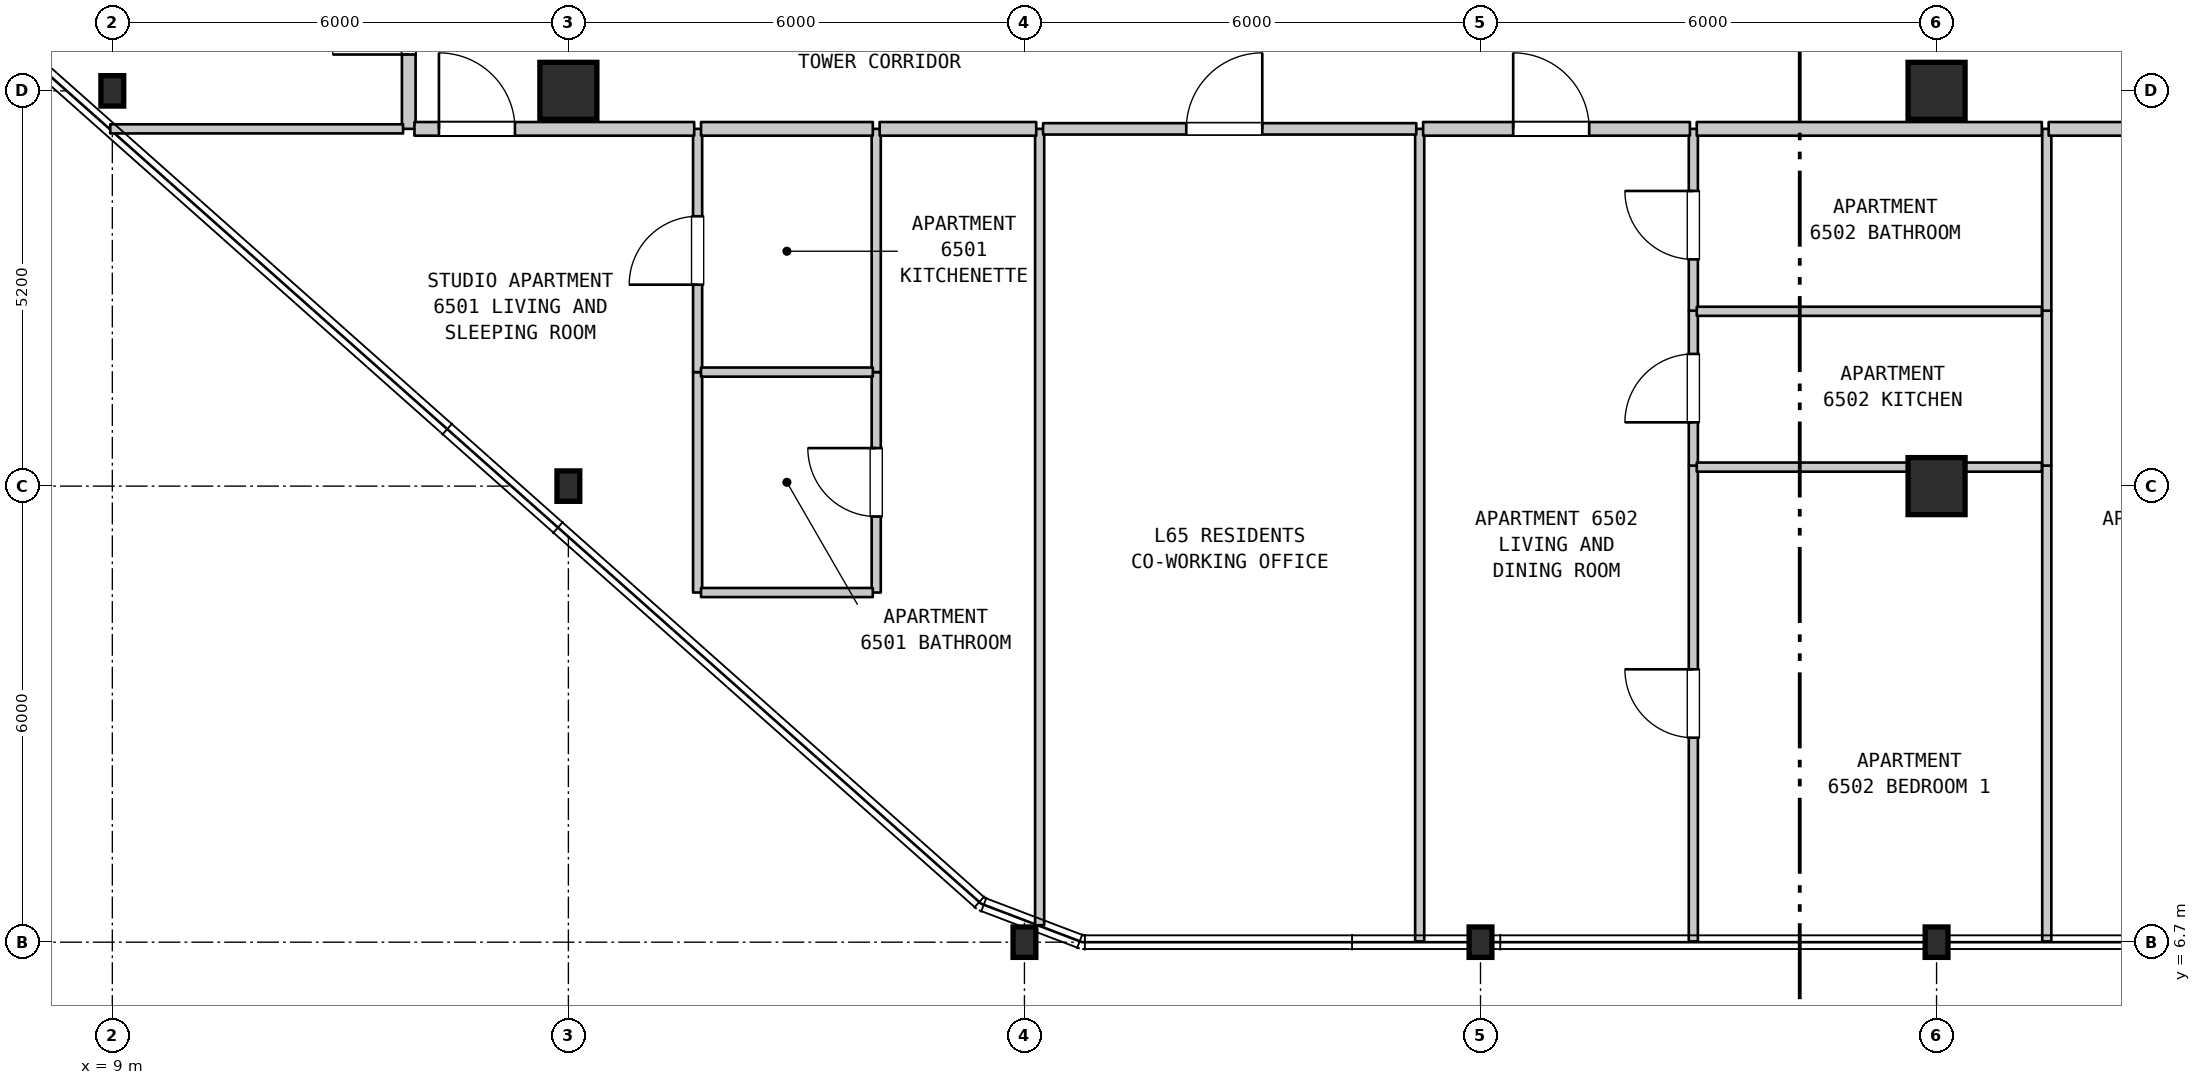
"""IFC4 building model, lengths in metres.
Left out: names, types, materials, properties, quantities, classifications, styles, units other than length and angle.
Written with IfcOpenShell. Run it as: python <this file> out.ifc"""

import sys

from ifc_helpers import new_model, si_unit, direction, frame, frame_2d, origin, origin_2d, place, context, subcontext, project, spatial, rectangle, i_section, extrude, element, fill, save


model = new_model("IFC4")
c1 = context("Model", 3, precision=1e-05, world=origin(), true_north=direction((0.0, 1.0)))
c2 = subcontext(c1, "Body", "Model", "MODEL_VIEW")
j1 = project(units=[si_unit("LENGTHUNIT", "METRE"), si_unit("PLANEANGLEUNIT", "RADIAN")], contexts=[c1])
p1 = place(None, origin())
s1 = spatial("IfcSite", under=j1, at=p1, CompositionType="ELEMENT")
p2 = place(p1, origin())
s2 = spatial("IfcBuilding", under=s1, at=p2, CompositionType="ELEMENT")
p3 = place(p2, frame((0.0, 0.0, 262.1)))
s3 = spatial("IfcBuildingStorey", under=s2, at=p3, CompositionType="ELEMENT", Elevation=262.1)
for number, where, z_axis, x_axis in (
    (1, (9.0, 17.9, 0.0), (0.0, 0.0, 1.0), (1.0, 0.0, 0.0)),
    (2, (15.0, 12.7, 0.0), (0.0, 0.0, 1.0), (1.0, 0.0, 0.0)),
):
    element("IfcColumn", number, at=place(p3, frame(where, z_axis=z_axis, x_axis=x_axis)), inside=s3, PredefinedType="COLUMN", context=c2, shape_type="SweptSolid", body=[
        extrude(i_section(OverallWidth=0.3, OverallDepth=0.4, WebThickness=0.013, FlangeThickness=0.024, FilletRadius=0.027, at=origin_2d()), origin(), (0.0, 0.0, 1.0), 3.7),
    ])
p4 = place(p3, frame((15.0, 17.9, 0.0), z_axis=(0.0, 0.0, 1.0), x_axis=(1.0, 0.0, 0.0)))
e3 = element("IfcColumn", 3, at=p4, inside=s3, PredefinedType="COLUMN", context=c2, shape_type="SweptSolid", body=[
    extrude(rectangle(XDim=0.75, YDim=0.75, at=origin_2d()), origin(), (0.0, 0.0, 1.0), 3.7),
])
for number, where, z_axis, x_axis in (
    (4, (21.0, 6.7, 0.0), (0.0, 0.0, 1.0), (1.0, 0.0, 0.0)),
    (5, (27.0, 6.7, 0.0), (0.0, 0.0, 1.0), (1.0, 0.0, 0.0)),
    (6, (33.0, 6.7, 0.0), (0.0, 0.0, 1.0), (1.0, 0.0, 0.0)),
):
    element("IfcColumn", number, at=place(p3, frame(where, z_axis=z_axis, x_axis=x_axis)), inside=s3, PredefinedType="COLUMN", context=c2, shape_type="SweptSolid", body=[
        extrude(i_section(OverallWidth=0.3, OverallDepth=0.4, WebThickness=0.013, FlangeThickness=0.024, FilletRadius=0.027, at=origin_2d()), origin(), (0.0, 0.0, 1.0), 3.7),
    ])
for number, where, z_axis, x_axis in (
    (7, (33.0, 12.7, 0.0), (0.0, 0.0, 1.0), (1.0, 0.0, 0.0)),
    (8, (33.0, 17.9, 0.0), (0.0, 0.0, 1.0), (1.0, 0.0, 0.0)),
):
    element("IfcColumn", number, at=place(p3, frame(where, z_axis=z_axis, x_axis=x_axis)), inside=s3, PredefinedType="COLUMN", context=c2, shape_type="SweptSolid", body=[
        extrude(rectangle(XDim=0.75, YDim=0.75, at=origin_2d()), origin(), (0.0, 0.0, 1.0), 3.7),
    ])
p5 = place(p3, frame((12.9, 17.4, 0.0), z_axis=(0.0, 0.0, 1.0), x_axis=(0.0, 1.0, 0.0)))
e9 = element("IfcWall", 9, at=p5, inside=s3, PredefinedType="STANDARD", context=c2, shape_type="SweptSolid", body=[
    extrude(rectangle(XDim=3.1, YDim=0.18, at=frame_2d((1.55, 0.0))), origin(), (0.0, 0.0, 1.0), 3.39),
])
p6 = place(p5, frame((0.978, 0.0, 0.0)))
e10 = element("IfcOpeningElement", 10, at=p6, cuts=e9, PredefinedType="OPENING", context=c2, shape_type="SweptSolid", body=[
    extrude(rectangle(XDim=1.0, YDim=2.15, at=frame_2d((0.5, 1.075))), frame((0.0, 0.1, 0.0), z_axis=(0.0, -1.0, 0.0), x_axis=(1.0, 0.0, 0.0)), (0.0, 0.0, 1.0), 0.2),
])
p7 = place(p3, frame((16.7, 11.3, 0.0), z_axis=(0.0, 0.0, 1.0), x_axis=(0.0, 1.0, 0.0)))
e11 = element("IfcWall", 11, at=p7, inside=s3, PredefinedType="PARTITIONING", context=c2, shape_type="SweptSolid", body=[
    extrude(rectangle(XDim=2.9, YDim=0.12, at=frame_2d((1.45, 0.0))), origin(), (0.0, 0.0, 1.0), 3.39),
])
p8 = place(p3, frame((16.7, 14.2, 0.0), z_axis=(0.0, 0.0, 1.0), x_axis=(0.0, 1.0, 0.0)))
e12 = element("IfcWall", 12, at=p8, inside=s3, PredefinedType="PARTITIONING", context=c2, shape_type="SweptSolid", body=[
    extrude(rectangle(XDim=3.2, YDim=0.12, at=frame_2d((1.6, 0.0))), origin(), (0.0, 0.0, 1.0), 3.39),
])
p9 = place(p8, frame((1.15, 0.0, 0.0)))
e13 = element("IfcOpeningElement", 13, at=p9, cuts=e12, PredefinedType="OPENING", context=c2, shape_type="SweptSolid", body=[
    extrude(rectangle(XDim=0.9, YDim=2.15, at=frame_2d((0.45, 1.075))), frame((0.0, 0.07, 0.0), z_axis=(0.0, -1.0, 0.0), x_axis=(1.0, 0.0, 0.0)), (0.0, 0.0, 1.0), 0.14),
])
p10 = place(p3, frame((19.05, 11.3, 0.0), z_axis=(0.0, 0.0, 1.0), x_axis=(0.0, 1.0, 0.0)))
e14 = element("IfcWall", 14, at=p10, inside=s3, PredefinedType="PARTITIONING", context=c2, shape_type="SweptSolid", body=[
    extrude(rectangle(XDim=2.9, YDim=0.12, at=frame_2d((1.45, 0.0))), origin(), (0.0, 0.0, 1.0), 3.39),
])
p11 = place(p10, frame((1.0, 0.0, 0.0)))
e15 = element("IfcOpeningElement", 15, at=p11, cuts=e14, PredefinedType="OPENING", context=c2, shape_type="SweptSolid", body=[
    extrude(rectangle(XDim=0.9, YDim=2.1, at=frame_2d((0.45, 1.05))), frame((0.0, 0.07, 0.0), z_axis=(0.0, -1.0, 0.0), x_axis=(1.0, 0.0, 0.0)), (0.0, 0.0, 1.0), 0.14),
])
p12 = place(p3, frame((19.05, 14.2, 0.0), z_axis=(0.0, 0.0, 1.0), x_axis=(0.0, 1.0, 0.0)))
e16 = element("IfcWall", 16, at=p12, inside=s3, PredefinedType="PARTITIONING", context=c2, shape_type="SweptSolid", body=[
    extrude(rectangle(XDim=3.2, YDim=0.12, at=frame_2d((1.6, 0.0))), origin(), (0.0, 0.0, 1.0), 3.39),
])
p13 = place(p3, frame((21.2, 6.923, 0.0), z_axis=(0.0, 0.0, 1.0), x_axis=(0.0, 1.0, 0.0)))
e17 = element("IfcWall", 17, at=p13, inside=s3, PredefinedType="PARTITIONING", context=c2, shape_type="SweptSolid", body=[
    extrude(rectangle(XDim=10.477, YDim=0.12, at=frame_2d((5.238, 0.0))), origin(), (0.0, 0.0, 1.0), 3.39),
])
p14 = place(p3, frame((26.2, 6.71, 0.0), z_axis=(0.0, 0.0, 1.0), x_axis=(0.0, 1.0, 0.0)))
e18 = element("IfcWall", 18, at=p14, inside=s3, PredefinedType="PARTITIONING", context=c2, shape_type="SweptSolid", body=[
    extrude(rectangle(XDim=10.69, YDim=0.12, at=frame_2d((5.345, 0.0))), origin(), (0.0, 0.0, 1.0), 3.39),
])
p15 = place(p3, frame((29.8, 6.71, 0.0), z_axis=(0.0, 0.0, 1.0), x_axis=(0.0, 1.0, 0.0)))
e19 = element("IfcWall", 19, at=p15, inside=s3, PredefinedType="PARTITIONING", context=c2, shape_type="SweptSolid", body=[
    extrude(rectangle(XDim=6.26, YDim=0.12, at=frame_2d((3.13, 0.0))), origin(), (0.0, 0.0, 1.0), 3.39),
])
p16 = place(p15, frame((2.68, 0.0, 0.0)))
e20 = element("IfcOpeningElement", 20, at=p16, cuts=e19, PredefinedType="OPENING", context=c2, shape_type="SweptSolid", body=[
    extrude(rectangle(XDim=0.9, YDim=2.15, at=frame_2d((0.45, 1.075))), frame((0.0, 0.07, 0.0), z_axis=(0.0, -1.0, 0.0), x_axis=(1.0, 0.0, 0.0)), (0.0, 0.0, 1.0), 0.14),
])
p17 = place(p3, frame((29.8, 12.97, 0.0), z_axis=(0.0, 0.0, 1.0), x_axis=(0.0, 1.0, 0.0)))
e21 = element("IfcWall", 21, at=p17, inside=s3, PredefinedType="PARTITIONING", context=c2, shape_type="SweptSolid", body=[
    extrude(rectangle(XDim=2.038, YDim=0.12, at=frame_2d((1.019, 0.0))), origin(), (0.0, 0.0, 1.0), 3.39),
])
p18 = place(p17, frame((0.569, 0.0, 0.0)))
e22 = element("IfcOpeningElement", 22, at=p18, cuts=e21, PredefinedType="OPENING", context=c2, shape_type="SweptSolid", body=[
    extrude(rectangle(XDim=0.9, YDim=2.15, at=frame_2d((0.45, 1.075))), frame((0.0, 0.07, 0.0), z_axis=(0.0, -1.0, 0.0), x_axis=(1.0, 0.0, 0.0)), (0.0, 0.0, 1.0), 0.14),
])
p19 = place(p3, frame((29.8, 15.008, 0.0), z_axis=(0.0, 0.0, 1.0), x_axis=(0.0, 1.0, 0.0)))
e23 = element("IfcWall", 23, at=p19, inside=s3, PredefinedType="PARTITIONING", context=c2, shape_type="SweptSolid", body=[
    extrude(rectangle(XDim=2.392, YDim=0.12, at=frame_2d((1.196, 0.0))), origin(), (0.0, 0.0, 1.0), 3.39),
])
p20 = place(p19, frame((0.675, 0.0, 0.0)))
e24 = element("IfcOpeningElement", 24, at=p20, cuts=e23, PredefinedType="OPENING", context=c2, shape_type="SweptSolid", body=[
    extrude(rectangle(XDim=0.9, YDim=2.1, at=frame_2d((0.45, 1.05))), frame((0.0, 0.07, 0.0), z_axis=(0.0, -1.0, 0.0), x_axis=(1.0, 0.0, 0.0)), (0.0, 0.0, 1.0), 0.14),
])
p21 = place(p3, frame((34.45, 6.71, 0.0), z_axis=(0.0, 0.0, 1.0), x_axis=(0.0, 1.0, 0.0)))
e25 = element("IfcWall", 25, at=p21, inside=s3, PredefinedType="PARTITIONING", context=c2, shape_type="SweptSolid", body=[
    extrude(rectangle(XDim=6.26, YDim=0.12, at=frame_2d((3.13, 0.0))), origin(), (0.0, 0.0, 1.0), 3.39),
])
p22 = place(p3, frame((34.45, 12.97, 0.0), z_axis=(0.0, 0.0, 1.0), x_axis=(0.0, 1.0, 0.0)))
e26 = element("IfcWall", 26, at=p22, inside=s3, PredefinedType="PARTITIONING", context=c2, shape_type="SweptSolid", body=[
    extrude(rectangle(XDim=2.038, YDim=0.12, at=frame_2d((1.019, 0.0))), origin(), (0.0, 0.0, 1.0), 3.39),
])
p23 = place(p3, frame((34.45, 15.008, 0.0), z_axis=(0.0, 0.0, 1.0), x_axis=(0.0, 1.0, 0.0)))
e27 = element("IfcWall", 27, at=p23, inside=s3, PredefinedType="PARTITIONING", context=c2, shape_type="SweptSolid", body=[
    extrude(rectangle(XDim=2.392, YDim=0.12, at=frame_2d((1.196, 0.0))), origin(), (0.0, 0.0, 1.0), 3.39),
])
p24 = place(p3, frame((16.745, 11.3, 0.0), z_axis=(0.0, 0.0, 1.0), x_axis=(1.0, 0.0, 0.0)))
e28 = element("IfcWall", 28, at=p24, inside=s3, PredefinedType="PARTITIONING", context=c2, shape_type="SweptSolid", body=[
    extrude(rectangle(XDim=2.26, YDim=0.12, at=frame_2d((1.13, 0.0))), origin(), (0.0, 0.0, 1.0), 3.39),
])
p25 = place(p3, frame((29.845, 12.95, 0.0), z_axis=(0.0, 0.0, 1.0), x_axis=(1.0, 0.0, 0.0)))
e29 = element("IfcWall", 29, at=p25, inside=s3, PredefinedType="PARTITIONING", context=c2, shape_type="SweptSolid", body=[
    extrude(rectangle(XDim=4.54, YDim=0.12, at=frame_2d((2.27, 0.0))), origin(), (0.0, 0.0, 1.0), 3.39),
])
p26 = place(p3, frame((16.745, 14.2, 0.0), z_axis=(0.0, 0.0, 1.0), x_axis=(1.0, 0.0, 0.0)))
e30 = element("IfcWall", 30, at=p26, inside=s3, PredefinedType="PARTITIONING", context=c2, shape_type="SweptSolid", body=[
    extrude(rectangle(XDim=2.26, YDim=0.12, at=frame_2d((1.13, 0.0))), origin(), (0.0, 0.0, 1.0), 3.39),
])
p27 = place(p3, frame((29.845, 15.0, 0.0), z_axis=(0.0, 0.0, 1.0), x_axis=(1.0, 0.0, 0.0)))
e31 = element("IfcWall", 31, at=p27, inside=s3, PredefinedType="PARTITIONING", context=c2, shape_type="SweptSolid", body=[
    extrude(rectangle(XDim=4.54, YDim=0.12, at=frame_2d((2.27, 0.0))), origin(), (0.0, 0.0, 1.0), 3.39),
])
p28 = place(p3, frame((8.973, 17.4, 0.0), z_axis=(0.0, 0.0, 1.0), x_axis=(1.0, 0.0, 0.0)))
e32 = element("IfcWall", 32, at=p28, inside=s3, PredefinedType="PARTITIONING", context=c2, shape_type="SweptSolid", body=[
    extrude(rectangle(XDim=3.852, YDim=0.12, at=frame_2d((1.926, 0.0))), origin(), (0.0, 0.0, 1.0), 3.39),
])
p29 = place(p3, frame((12.975, 17.4, 0.0), z_axis=(0.0, 0.0, 1.0), x_axis=(1.0, 0.0, 0.0)))
e33 = element("IfcWall", 33, at=p29, inside=s3, PredefinedType="STANDARD", context=c2, shape_type="SweptSolid", body=[
    extrude(rectangle(XDim=3.68, YDim=0.18, at=frame_2d((1.84, 0.0))), origin(), (0.0, 0.0, 1.0), 3.39),
])
p30 = place(p29, frame((0.322, 0.0, 0.0)))
e34 = element("IfcOpeningElement", 34, at=p30, cuts=e33, PredefinedType="OPENING", context=c2, shape_type="SweptSolid", body=[
    extrude(rectangle(XDim=1.0, YDim=2.15, at=frame_2d((0.5, 1.075))), frame((0.0, 0.1, 0.0), z_axis=(0.0, -1.0, 0.0), x_axis=(1.0, 0.0, 0.0)), (0.0, 0.0, 1.0), 0.2),
])
p31 = place(p3, frame((16.745, 17.4, 0.0), z_axis=(0.0, 0.0, 1.0), x_axis=(1.0, 0.0, 0.0)))
e35 = element("IfcWall", 35, at=p31, inside=s3, PredefinedType="STANDARD", context=c2, shape_type="SweptSolid", body=[
    extrude(rectangle(XDim=2.26, YDim=0.18, at=frame_2d((1.13, 0.0))), origin(), (0.0, 0.0, 1.0), 3.39),
])
p32 = place(p3, frame((19.095, 17.4, 0.0), z_axis=(0.0, 0.0, 1.0), x_axis=(1.0, 0.0, 0.0)))
e36 = element("IfcWall", 36, at=p32, inside=s3, PredefinedType="STANDARD", context=c2, shape_type="SweptSolid", body=[
    extrude(rectangle(XDim=2.06, YDim=0.18, at=frame_2d((1.03, 0.0))), origin(), (0.0, 0.0, 1.0), 3.39),
])
p33 = place(p3, frame((21.245, 17.4, 0.0), z_axis=(0.0, 0.0, 1.0), x_axis=(1.0, 0.0, 0.0)))
e37 = element("IfcWall", 37, at=p33, inside=s3, PredefinedType="STANDARD", context=c2, shape_type="SweptSolid", body=[
    extrude(rectangle(XDim=4.91, YDim=0.15, at=frame_2d((2.455, 0.0))), origin(), (0.0, 0.0, 1.0), 3.39),
])
p34 = place(p33, frame((1.884, 0.0, 0.0)))
e38 = element("IfcOpeningElement", 38, at=p34, cuts=e37, PredefinedType="OPENING", context=c2, shape_type="SweptSolid", body=[
    extrude(rectangle(XDim=1.0, YDim=2.15, at=frame_2d((0.5, 1.075))), frame((0.0, 0.085, 0.0), z_axis=(0.0, -1.0, 0.0), x_axis=(1.0, 0.0, 0.0)), (0.0, 0.0, 1.0), 0.17),
])
p35 = place(p3, frame((26.245, 17.4, 0.0), z_axis=(0.0, 0.0, 1.0), x_axis=(1.0, 0.0, 0.0)))
e39 = element("IfcWall", 39, at=p35, inside=s3, PredefinedType="STANDARD", context=c2, shape_type="SweptSolid", body=[
    extrude(rectangle(XDim=3.51, YDim=0.18, at=frame_2d((1.755, 0.0))), origin(), (0.0, 0.0, 1.0), 3.39),
])
p36 = place(p35, frame((1.185, 0.0, 0.0)))
e40 = element("IfcOpeningElement", 40, at=p36, cuts=e39, PredefinedType="OPENING", context=c2, shape_type="SweptSolid", body=[
    extrude(rectangle(XDim=1.0, YDim=2.15, at=frame_2d((0.5, 1.075))), frame((0.0, 0.1, 0.0), z_axis=(0.0, -1.0, 0.0), x_axis=(1.0, 0.0, 0.0)), (0.0, 0.0, 1.0), 0.2),
])
p37 = place(p3, frame((29.845, 17.4, 0.0), z_axis=(0.0, 0.0, 1.0), x_axis=(1.0, 0.0, 0.0)))
e41 = element("IfcWall", 41, at=p37, inside=s3, PredefinedType="STANDARD", context=c2, shape_type="SweptSolid", body=[
    extrude(rectangle(XDim=4.54, YDim=0.18, at=frame_2d((2.27, 0.0))), origin(), (0.0, 0.0, 1.0), 3.39),
])
p38 = place(p3, frame((34.475, 17.4, 0.0), z_axis=(0.0, 0.0, 1.0), x_axis=(1.0, 0.0, 0.0)))
e42 = element("IfcWall", 42, at=p38, inside=s3, PredefinedType="STANDARD", context=c2, shape_type="SweptSolid", body=[
    extrude(rectangle(XDim=3.51, YDim=0.18, at=frame_2d((1.755, 0.0))), origin(), (0.0, 0.0, 1.0), 3.39),
])
p39 = place(p38, frame((1.185, 0.0, 0.0)))
e43 = element("IfcOpeningElement", 43, at=p39, cuts=e42, PredefinedType="OPENING", context=c2, shape_type="SweptSolid", body=[
    extrude(rectangle(XDim=1.0, YDim=2.15, at=frame_2d((0.5, 1.075))), frame((0.0, 0.1, 0.0), z_axis=(0.0, -1.0, 0.0), x_axis=(1.0, 0.0, 0.0)), (0.0, 0.0, 1.0), 0.2),
])
p40 = place(p6, origin())
e44 = element("IfcDoor", 44, at=p40, inside=s3, OperationType="SINGLE_SWING_LEFT", PredefinedType="DOOR", context=c2, shape_type="SweptSolid", body=[
    extrude(rectangle(XDim=1.0, YDim=2.15, at=frame_2d((0.5, 1.075))), frame((0.0, 0.025, 0.0), z_axis=(0.0, -1.0, 0.0), x_axis=(1.0, 0.0, 0.0)), (0.0, 0.0, 1.0), 0.05),
])
fill(e10, e44)
p41 = place(p9, origin())
e45 = element("IfcDoor", 45, at=p41, inside=s3, OperationType="SINGLE_SWING_LEFT", PredefinedType="DOOR", context=c2, shape_type="SweptSolid", body=[
    extrude(rectangle(XDim=0.9, YDim=2.15, at=frame_2d((0.45, 1.075))), frame((0.0, 0.025, 0.0), z_axis=(0.0, -1.0, 0.0), x_axis=(1.0, 0.0, 0.0)), (0.0, 0.0, 1.0), 0.05),
])
fill(e13, e45)
p42 = place(p11, origin())
e46 = element("IfcDoor", 46, at=p42, inside=s3, OperationType="SINGLE_SWING_RIGHT", PredefinedType="DOOR", context=c2, shape_type="SweptSolid", body=[
    extrude(rectangle(XDim=0.9, YDim=2.1, at=frame_2d((0.45, 1.05))), frame((0.0, 0.025, 0.0), z_axis=(0.0, -1.0, 0.0), x_axis=(1.0, 0.0, 0.0)), (0.0, 0.0, 1.0), 0.05),
])
fill(e15, e46)
p43 = place(p16, origin())
e47 = element("IfcDoor", 47, at=p43, inside=s3, OperationType="SINGLE_SWING_RIGHT", PredefinedType="DOOR", context=c2, shape_type="SweptSolid", body=[
    extrude(rectangle(XDim=0.9, YDim=2.15, at=frame_2d((0.45, 1.075))), frame((0.0, 0.025, 0.0), z_axis=(0.0, -1.0, 0.0), x_axis=(1.0, 0.0, 0.0)), (0.0, 0.0, 1.0), 0.05),
])
fill(e20, e47)
p44 = place(p18, origin())
e48 = element("IfcDoor", 48, at=p44, inside=s3, OperationType="SINGLE_SWING_LEFT", PredefinedType="DOOR", context=c2, shape_type="SweptSolid", body=[
    extrude(rectangle(XDim=0.9, YDim=2.15, at=frame_2d((0.45, 1.075))), frame((0.0, 0.025, 0.0), z_axis=(0.0, -1.0, 0.0), x_axis=(1.0, 0.0, 0.0)), (0.0, 0.0, 1.0), 0.05),
])
fill(e22, e48)
p45 = place(p20, origin())
e49 = element("IfcDoor", 49, at=p45, inside=s3, OperationType="SINGLE_SWING_RIGHT", PredefinedType="DOOR", context=c2, shape_type="SweptSolid", body=[
    extrude(rectangle(XDim=0.9, YDim=2.1, at=frame_2d((0.45, 1.05))), frame((0.0, 0.025, 0.0), z_axis=(0.0, -1.0, 0.0), x_axis=(1.0, 0.0, 0.0)), (0.0, 0.0, 1.0), 0.05),
])
fill(e24, e49)
p46 = place(p30, origin())
e50 = element("IfcDoor", 50, at=p46, inside=s3, OperationType="SINGLE_SWING_LEFT", PredefinedType="DOOR", context=c2, shape_type="SweptSolid", body=[
    extrude(rectangle(XDim=1.0, YDim=2.15, at=frame_2d((0.5, 1.075))), frame((0.0, 0.025, 0.0), z_axis=(0.0, -1.0, 0.0), x_axis=(1.0, 0.0, 0.0)), (0.0, 0.0, 1.0), 0.05),
])
fill(e34, e50)
p47 = place(p34, origin())
e51 = element("IfcDoor", 51, at=p47, inside=s3, OperationType="SINGLE_SWING_RIGHT", PredefinedType="DOOR", context=c2, shape_type="SweptSolid", body=[
    extrude(rectangle(XDim=1.0, YDim=2.15, at=frame_2d((0.5, 1.075))), frame((0.0, 0.025, 0.0), z_axis=(0.0, -1.0, 0.0), x_axis=(1.0, 0.0, 0.0)), (0.0, 0.0, 1.0), 0.05),
])
fill(e38, e51)
p48 = place(p36, origin())
e52 = element("IfcDoor", 52, at=p48, inside=s3, OperationType="SINGLE_SWING_LEFT", PredefinedType="DOOR", context=c2, shape_type="SweptSolid", body=[
    extrude(rectangle(XDim=1.0, YDim=2.15, at=frame_2d((0.5, 1.075))), frame((0.0, 0.025, 0.0), z_axis=(0.0, -1.0, 0.0), x_axis=(1.0, 0.0, 0.0)), (0.0, 0.0, 1.0), 0.05),
])
fill(e40, e52)
save(model, sys.argv[1])
